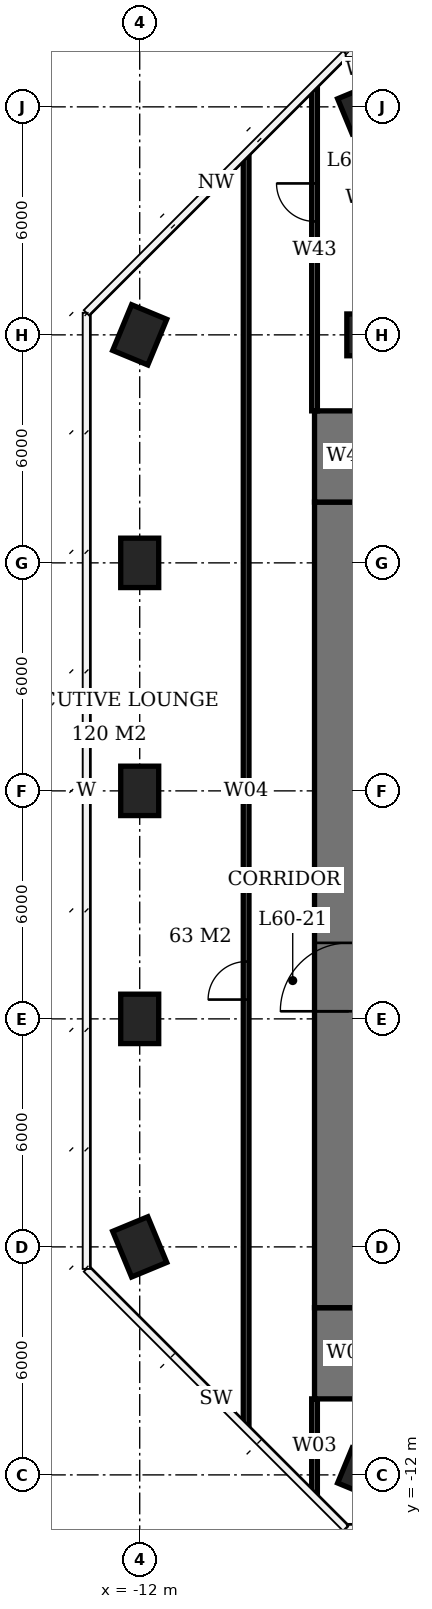
"""IFC4 building model, lengths in metres.
Left out: names, types, materials, properties, quantities, classifications, styles, units other than length and angle.
Written with IfcOpenShell. Run it as: python <this file> out.ifc"""

import sys

from ifc_helpers import new_model, si_unit, direction, frame, frame_2d, origin, origin_2d, place, context, subcontext, project, spatial, rectangle, extrude, element, fill, save


model = new_model("IFC4")
c1 = context("Model", 3, precision=1e-05, world=origin(), true_north=direction((0.0, 1.0)))
c2 = subcontext(c1, "Body", "Model", "MODEL_VIEW")
j1 = project(units=[si_unit("LENGTHUNIT", "METRE"), si_unit("PLANEANGLEUNIT", "RADIAN")], contexts=[c1])
p1 = place(None, origin())
s1 = spatial("IfcSite", under=j1, at=p1, CompositionType="ELEMENT")
p2 = place(p1, origin())
s2 = spatial("IfcBuilding", under=s1, at=p2, CompositionType="ELEMENT")
p3 = place(p2, frame((0.0, 0.0, 245.0)))
s3 = spatial("IfcBuildingStorey", under=s2, at=p3, CompositionType="ELEMENT", Elevation=245.0)
for number, where, z_axis, x_axis in (
    (1, (-12.0, -6.0, 0.0), (0.0, 0.0, 1.0), (-0.383, 0.924, 0.0)),
    (2, (-12.0, 0.0, 0.0), (0.0, 0.0, 1.0), (0.0, 1.0, 0.0)),
    (3, (-12.0, 6.0, 0.0), (0.0, 0.0, 1.0), (0.0, 1.0, 0.0)),
    (4, (-12.0, 12.0, 0.0), (0.0, 0.0, 1.0), (0.0, 1.0, 0.0)),
    (5, (-12.0, 18.0, 0.0), (0.0, 0.0, 1.0), (0.383, 0.924, 0.0)),
    (6, (-6.0, -12.0, 0.0), (0.0, 0.0, 1.0), (-0.924, 0.383, 0.0)),
):
    element("IfcColumn", number, at=place(p3, frame(where, z_axis=z_axis, x_axis=x_axis)), inside=s3, PredefinedType="COLUMN", context=c2, shape_type="SweptSolid", body=[
        extrude(rectangle(XDim=1.3, YDim=1.0, at=origin_2d()), origin(), (0.0, 0.0, 1.0), 3.9),
    ])
p4 = place(p3, frame((-6.0, 18.0, 0.0), z_axis=(0.0, 0.0, 1.0), x_axis=(1.0, 0.0, 0.0)))
e7 = element("IfcColumn", 7, at=p4, inside=s3, PredefinedType="COLUMN", context=c2, shape_type="SweptSolid", body=[
    extrude(rectangle(XDim=1.1, YDim=1.1, at=origin_2d()), origin(), (0.0, 0.0, 1.0), 3.9),
])
p5 = place(p3, frame((-6.0, 24.0, 0.0), z_axis=(0.0, 0.0, 1.0), x_axis=(0.923879532511, 0.382683432365, 0.0)))
e8 = element("IfcColumn", 8, at=p5, inside=s3, PredefinedType="COLUMN", context=c2, shape_type="SweptSolid", body=[
    extrude(rectangle(XDim=1.3, YDim=1.0, at=origin_2d()), origin(), (0.0, 0.0, 1.0), 3.9),
])
p6 = place(p3, frame((-6.5, -7.6, 0.0), z_axis=(0.0, 0.0, 1.0), x_axis=(0.0, 1.0, 0.0)))
e9 = element("IfcWall", 9, at=p6, inside=s3, PredefinedType="SHEAR", context=c2, shape_type="SweptSolid", body=[
    extrude(rectangle(XDim=21.2, YDim=1.8, at=frame_2d((10.6, 0.0))), origin(), (0.0, 0.0, 1.0), 3.9),
])
p7 = place(p6, frame((7.8, 0.0, 0.0)))
e10 = element("IfcOpeningElement", 10, at=p7, cuts=e9, PredefinedType="OPENING", context=c2, shape_type="SweptSolid", body=[
    extrude(rectangle(XDim=1.8, YDim=2.4, at=frame_2d((0.9, 1.2))), frame((0.0, 0.91, 0.0), z_axis=(0.0, -1.0, 0.0), x_axis=(1.0, 0.0, 0.0)), (0.0, 0.0, 1.0), 1.82),
])
for number, where, z_axis, x_axis in (
    (11, (-6.5, -10.0, 0.0), (0.0, 0.0, 1.0), (0.0, 1.0, 0.0)),
    (12, (-6.5, 13.6, 0.0), (0.0, 0.0, 1.0), (0.0, 1.0, 0.0)),
):
    element("IfcWall", number, at=place(p3, frame(where, z_axis=z_axis, x_axis=x_axis)), inside=s3, PredefinedType="SHEAR", context=c2, shape_type="SweptSolid", body=[
        extrude(rectangle(XDim=2.4, YDim=1.8, at=frame_2d((1.2, 0.0))), origin(), (0.0, 0.0, 1.0), 3.9),
    ])
p8 = place(p3, frame((-9.2, -10.689, 0.0), z_axis=(0.0, 0.0, 1.0), x_axis=(0.0, 1.0, 0.0)))
e13 = element("IfcWall", 13, at=p8, inside=s3, PredefinedType="PARTITIONING", context=c2, shape_type="SweptSolid", body=[
    extrude(rectangle(XDim=33.378, YDim=0.15, at=frame_2d((16.689, 0.0))), origin(), (0.0, 0.0, 1.0), 3.65),
])
p9 = place(p8, frame((11.197, 0.0, 0.0)))
e14 = element("IfcOpeningElement", 14, at=p9, cuts=e13, PredefinedType="OPENING", context=c2, shape_type="SweptSolid", body=[
    extrude(rectangle(XDim=1.0, YDim=2.4, at=frame_2d((0.5, 1.2))), frame((0.0, 0.085, 0.0), z_axis=(0.0, -1.0, 0.0), x_axis=(1.0, 0.0, 0.0)), (0.0, 0.0, 1.0), 0.17),
])
p10 = place(p3, frame((-7.4, -12.489, 0.0), z_axis=(0.0, 0.0, 1.0), x_axis=(0.0, 1.0, 0.0)))
e15 = element("IfcWall", 15, at=p10, inside=s3, PredefinedType="PARTITIONING", context=c2, shape_type="SweptSolid", body=[
    extrude(rectangle(XDim=2.489, YDim=0.15, at=frame_2d((1.245, 0.0))), origin(), (0.0, 0.0, 1.0), 3.65),
])
p11 = place(p3, frame((-7.4, 16.0, 0.0), z_axis=(0.0, 0.0, 1.0), x_axis=(0.0, 1.0, 0.0)))
e16 = element("IfcWall", 16, at=p11, inside=s3, PredefinedType="PARTITIONING", context=c2, shape_type="SweptSolid", body=[
    extrude(rectangle(XDim=8.489, YDim=0.15, at=frame_2d((4.245, 0.0))), origin(), (0.0, 0.0, 1.0), 3.65),
])
p12 = place(p11, frame((4.985, 0.0, 0.0)))
e17 = element("IfcOpeningElement", 17, at=p12, cuts=e16, PredefinedType="OPENING", context=c2, shape_type="SweptSolid", body=[
    extrude(rectangle(XDim=1.0, YDim=2.4, at=frame_2d((0.5, 1.2))), frame((0.0, 0.085, 0.0), z_axis=(0.0, -1.0, 0.0), x_axis=(1.0, 0.0, 0.0)), (0.0, 0.0, 1.0), 0.17),
])
p13 = place(p7, origin())
e18 = element("IfcDoor", 18, at=p13, inside=s3, OperationType="DOUBLE_DOOR_SINGLE_SWING", PredefinedType="DOOR", context=c2, shape_type="SweptSolid", body=[
    extrude(rectangle(XDim=1.8, YDim=2.4, at=frame_2d((0.9, 1.2))), frame((0.0, 0.025, 0.0), z_axis=(0.0, -1.0, 0.0), x_axis=(1.0, 0.0, 0.0)), (0.0, 0.0, 1.0), 0.05),
])
fill(e10, e18)
p14 = place(p9, origin())
e19 = element("IfcDoor", 19, at=p14, inside=s3, OperationType="SINGLE_SWING_LEFT", PredefinedType="DOOR", context=c2, shape_type="SweptSolid", body=[
    extrude(rectangle(XDim=1.0, YDim=2.4, at=frame_2d((0.5, 1.2))), frame((0.0, 0.025, 0.0), z_axis=(0.0, -1.0, 0.0), x_axis=(1.0, 0.0, 0.0)), (0.0, 0.0, 1.0), 0.05),
])
fill(e14, e19)
p15 = place(p12, origin())
e20 = element("IfcDoor", 20, at=p15, inside=s3, OperationType="SINGLE_SWING_RIGHT", PredefinedType="DOOR", context=c2, shape_type="SweptSolid", body=[
    extrude(rectangle(XDim=1.0, YDim=2.4, at=frame_2d((0.5, 1.2))), frame((0.0, 0.025, 0.0), z_axis=(0.0, -1.0, 0.0), x_axis=(1.0, 0.0, 0.0)), (0.0, 0.0, 1.0), 0.05),
])
fill(e17, e20)
save(model, sys.argv[1])
